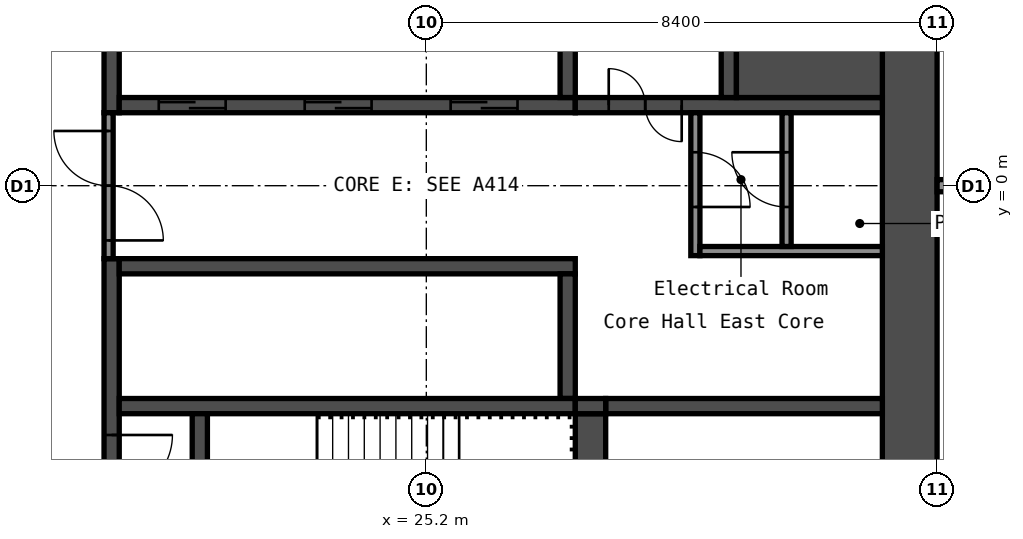
"""IFC4 building model, lengths in metres.
Left out: names, types, materials, properties, quantities, classifications, styles, units other than length and angle.
Written with IfcOpenShell. Run it as: python <this file> out.ifc"""

import sys

from ifc_helpers import new_model, si_unit, direction, frame, frame_2d, origin, place, context, subcontext, project, spatial, rectangle, extrude, element, fill, save


model = new_model("IFC4")
c1 = context("Model", 3, precision=1e-05, world=origin(), true_north=direction((0.0, 1.0)))
c2 = subcontext(c1, "Body", "Model", "MODEL_VIEW")
j1 = project(units=[si_unit("LENGTHUNIT", "METRE"), si_unit("PLANEANGLEUNIT", "RADIAN")], contexts=[c1])
p1 = place(None, origin())
s1 = spatial("IfcSite", under=j1, at=p1, CompositionType="ELEMENT")
p2 = place(p1, origin())
s2 = spatial("IfcBuilding", under=s1, at=p2, CompositionType="ELEMENT")
p3 = place(p2, frame((0.0, 0.0, 91.4)))
s3 = spatial("IfcBuildingStorey", under=s2, at=p3, CompositionType="ELEMENT", Elevation=91.4)
p4 = place(p3, frame((33.15, -8.4, 0.0), z_axis=(0.0, 0.0, 1.0), x_axis=(0.0, 1.0, 0.0)))
e1 = element("IfcWall", 1, at=p4, inside=s3, PredefinedType="SHEAR", context=c2, shape_type="SweptSolid", body=[
    extrude(rectangle(XDim=16.8, YDim=0.9, at=frame_2d((8.4, 0.0))), origin(), (0.0, 0.0, 1.0), 2.8),
])
p5 = place(p3, frame((20.025, 1.2, 0.0), z_axis=(0.0, 0.0, 1.0), x_axis=(0.0, 1.0, 0.0)))
e2 = element("IfcWall", 2, at=p5, inside=s3, PredefinedType="SHEAR", context=c2, shape_type="SweptSolid", body=[
    extrude(rectangle(XDim=6.3, YDim=0.25, at=frame_2d((3.15, 0.0))), origin(), (0.0, 0.0, 1.0), 2.8),
])
p6 = place(p3, frame((20.025, -7.5, 0.0), z_axis=(0.0, 0.0, 1.0), x_axis=(0.0, 1.0, 0.0)))
e3 = element("IfcWall", 3, at=p6, inside=s3, PredefinedType="SHEAR", context=c2, shape_type="SweptSolid", body=[
    extrude(rectangle(XDim=6.3, YDim=0.25, at=frame_2d((3.15, 0.0))), origin(), (0.0, 0.0, 1.0), 2.8),
])
p7 = place(p6, frame((2.4, 0.0, 0.0)))
e4 = element("IfcOpeningElement", 4, at=p7, cuts=e3, PredefinedType="OPENING", context=c2, shape_type="SweptSolid", body=[
    extrude(rectangle(XDim=1.0, YDim=2.1, at=frame_2d((0.5, 1.05))), frame((0.0, 0.135, 0.0), z_axis=(0.0, -1.0, 0.0), x_axis=(1.0, 0.0, 0.0)), (0.0, 0.0, 1.0), 0.27),
])
p8 = place(p3, frame((20.15, 1.325, 0.0), z_axis=(0.0, 0.0, 1.0), x_axis=(1.0, 0.0, 0.0)))
e5 = element("IfcWall", 5, at=p8, inside=s3, PredefinedType="SHEAR", context=c2, shape_type="SweptSolid", body=[
    extrude(rectangle(XDim=7.5, YDim=0.25, at=frame_2d((3.75, 0.0))), origin(), (0.0, 0.0, 1.0), 2.8),
])
p9 = place(p8, frame((0.65, 0.0, 0.0)))
e6 = element("IfcOpeningElement", 6, at=p9, cuts=e5, PredefinedType="OPENING", context=c2, shape_type="SweptSolid", body=[
    extrude(rectangle(XDim=1.1, YDim=2.1, at=frame_2d((0.55, 1.05))), frame((0.0, 0.135, 0.0), z_axis=(0.0, -1.0, 0.0), x_axis=(1.0, 0.0, 0.0)), (0.0, 0.0, 1.0), 0.27),
])
p10 = place(p8, frame((3.05, 0.0, 0.0)))
e7 = element("IfcOpeningElement", 7, at=p10, cuts=e5, PredefinedType="OPENING", context=c2, shape_type="SweptSolid", body=[
    extrude(rectangle(XDim=1.1, YDim=2.1, at=frame_2d((0.55, 1.05))), frame((0.0, 0.135, 0.0), z_axis=(0.0, -1.0, 0.0), x_axis=(1.0, 0.0, 0.0)), (0.0, 0.0, 1.0), 0.27),
])
p11 = place(p8, frame((5.45, 0.0, 0.0)))
e8 = element("IfcOpeningElement", 8, at=p11, cuts=e5, PredefinedType="OPENING", context=c2, shape_type="SweptSolid", body=[
    extrude(rectangle(XDim=1.1, YDim=2.1, at=frame_2d((0.55, 1.05))), frame((0.0, 0.135, 0.0), z_axis=(0.0, -1.0, 0.0), x_axis=(1.0, 0.0, 0.0)), (0.0, 0.0, 1.0), 0.27),
])
p12 = place(p3, frame((27.525, 1.45, 0.0), z_axis=(0.0, 0.0, 1.0), x_axis=(0.0, 1.0, 0.0)))
e9 = element("IfcWall", 9, at=p12, inside=s3, PredefinedType="SHEAR", context=c2, shape_type="SweptSolid", body=[
    extrude(rectangle(XDim=2.05, YDim=0.25, at=frame_2d((1.025, 0.0))), origin(), (0.0, 0.0, 1.0), 2.8),
])
p13 = place(p3, frame((27.65, 1.325, 0.0), z_axis=(0.0, 0.0, 1.0), x_axis=(1.0, 0.0, 0.0)))
e10 = element("IfcWall", 10, at=p13, inside=s3, PredefinedType="SHEAR", context=c2, shape_type="SweptSolid", body=[
    extrude(rectangle(XDim=5.05, YDim=0.25, at=frame_2d((2.525, 0.0))), origin(), (0.0, 0.0, 1.0), 2.8),
])
p14 = place(p13, frame((0.55, 0.0, 0.0)))
e11 = element("IfcOpeningElement", 11, at=p14, cuts=e10, PredefinedType="OPENING", context=c2, shape_type="SweptSolid", body=[
    extrude(rectangle(XDim=1.2, YDim=2.1, at=frame_2d((0.6, 1.05))), frame((0.0, 0.135, 0.0), z_axis=(0.0, -1.0, 0.0), x_axis=(1.0, 0.0, 0.0)), (0.0, 0.0, 1.0), 0.27),
])
p15 = place(p3, frame((30.175, 1.45, 0.0), z_axis=(0.0, 0.0, 1.0), x_axis=(0.0, 1.0, 0.0)))
e12 = element("IfcWall", 12, at=p15, inside=s3, PredefinedType="SHEAR", context=c2, shape_type="SweptSolid", body=[
    extrude(rectangle(XDim=6.05, YDim=0.25, at=frame_2d((3.025, 0.0))), origin(), (0.0, 0.0, 1.0), 2.8),
])
p16 = place(p15, frame((2.625, 0.0, 0.0)))
e13 = element("IfcOpeningElement", 13, at=p16, cuts=e12, PredefinedType="OPENING", context=c2, shape_type="SweptSolid", body=[
    extrude(rectangle(XDim=1.1, YDim=2.1, at=frame_2d((0.55, 1.05))), frame((0.0, 0.135, 0.0), z_axis=(0.0, -1.0, 0.0), x_axis=(1.0, 0.0, 0.0)), (0.0, 0.0, 1.0), 0.27),
])
p17 = place(p3, frame((30.3, 2.375, 0.0), z_axis=(0.0, 0.0, 1.0), x_axis=(1.0, 0.0, 0.0)))
e14 = element("IfcWall", 14, at=p17, inside=s3, PredefinedType="SHEAR", context=c2, shape_type="SweptSolid", body=[
    extrude(rectangle(XDim=2.4, YDim=1.85, at=frame_2d((1.2, 0.0))), origin(), (0.0, 0.0, 1.0), 2.8),
])
p18 = place(p3, frame((20.15, -1.325, 0.0), z_axis=(0.0, 0.0, 1.0), x_axis=(1.0, 0.0, 0.0)))
e15 = element("IfcWall", 15, at=p18, inside=s3, PredefinedType="SHEAR", context=c2, shape_type="SweptSolid", body=[
    extrude(rectangle(XDim=7.5, YDim=0.25, at=frame_2d((3.75, 0.0))), origin(), (0.0, 0.0, 1.0), 2.8),
])
p19 = place(p3, frame((27.525, -3.5, 0.0), z_axis=(0.0, 0.0, 1.0), x_axis=(0.0, 1.0, 0.0)))
e16 = element("IfcWall", 16, at=p19, inside=s3, PredefinedType="SHEAR", context=c2, shape_type="SweptSolid", body=[
    extrude(rectangle(XDim=2.05, YDim=0.25, at=frame_2d((1.025, 0.0))), origin(), (0.0, 0.0, 1.0), 2.8),
])
p20 = place(p3, frame((20.15, -3.625, 0.0), z_axis=(0.0, 0.0, 1.0), x_axis=(1.0, 0.0, 0.0)))
e17 = element("IfcWall", 17, at=p20, inside=s3, PredefinedType="SHEAR", context=c2, shape_type="SweptSolid", body=[
    extrude(rectangle(XDim=7.5, YDim=0.25, at=frame_2d((3.75, 0.0))), origin(), (0.0, 0.0, 1.0), 2.8),
])
p21 = place(p3, frame((21.475, -7.5, 0.0), z_axis=(0.0, 0.0, 1.0), x_axis=(0.0, 1.0, 0.0)))
e18 = element("IfcWall", 18, at=p21, inside=s3, PredefinedType="SHEAR", context=c2, shape_type="SweptSolid", body=[
    extrude(rectangle(XDim=3.75, YDim=0.25, at=frame_2d((1.875, 0.0))), origin(), (0.0, 0.0, 1.0), 2.8),
])
p22 = place(p21, frame((1.3, 0.0, 0.0)))
e19 = element("IfcOpeningElement", 19, at=p22, cuts=e18, PredefinedType="OPENING", context=c2, shape_type="SweptSolid", body=[
    extrude(rectangle(XDim=1.2, YDim=2.1, at=frame_2d((0.6, 1.05))), frame((0.0, 0.135, 0.0), z_axis=(0.0, -1.0, 0.0), x_axis=(1.0, 0.0, 0.0)), (0.0, 0.0, 1.0), 0.27),
])
p23 = place(p3, frame((27.9, -7.5, 0.0), z_axis=(0.0, 0.0, 1.0), x_axis=(0.0, 1.0, 0.0)))
e20 = element("IfcWall", 20, at=p23, inside=s3, PredefinedType="SHEAR", context=c2, shape_type="SweptSolid", body=[
    extrude(rectangle(XDim=3.75, YDim=0.5, at=frame_2d((1.875, 0.0))), origin(), (0.0, 0.0, 1.0), 2.8),
])
p24 = place(p3, frame((28.15, -3.625, 0.0), z_axis=(0.0, 0.0, 1.0), x_axis=(1.0, 0.0, 0.0)))
e21 = element("IfcWall", 21, at=p24, inside=s3, PredefinedType="SHEAR", context=c2, shape_type="SweptSolid", body=[
    extrude(rectangle(XDim=4.55, YDim=0.25, at=frame_2d((2.275, 0.0))), origin(), (0.0, 0.0, 1.0), 2.8),
])
p25 = place(p3, frame((27.65, -3.625, 0.0), z_axis=(0.0, 0.0, 1.0), x_axis=(1.0, 0.0, 0.0)))
e22 = element("IfcWall", 22, at=p25, inside=s3, PredefinedType="SHEAR", context=c2, shape_type="SweptSolid", body=[
    extrude(rectangle(XDim=0.5, YDim=0.25, at=frame_2d((0.25, 0.0))), origin(), (0.0, 0.0, 1.0), 2.8),
])
p26 = place(p3, frame((19.975, -1.2, 0.0), z_axis=(0.0, 0.0, 1.0), x_axis=(0.0, 1.0, 0.0)))
e23 = element("IfcWall", 23, at=p26, inside=s3, PredefinedType="PARTITIONING", context=c2, shape_type="SweptSolid", body=[
    extrude(rectangle(XDim=2.4, YDim=0.15, at=frame_2d((1.2, 0.0))), origin(), (0.0, 0.0, 1.0), 2.8),
])
p27 = place(p26, frame((0.3, 0.0, 0.0)))
e24 = element("IfcOpeningElement", 24, at=p27, cuts=e23, PredefinedType="OPENING", context=c2, shape_type="SweptSolid", body=[
    extrude(rectangle(XDim=1.8, YDim=2.1, at=frame_2d((0.9, 1.05))), frame((0.0, 0.085, 0.0), z_axis=(0.0, -1.0, 0.0), x_axis=(1.0, 0.0, 0.0)), (0.0, 0.0, 1.0), 0.17),
])
p28 = place(p3, frame((29.625, -1.15, 0.0), z_axis=(0.0, 0.0, 1.0), x_axis=(0.0, 1.0, 0.0)))
e25 = element("IfcWall", 25, at=p28, inside=s3, PredefinedType="PARTITIONING", context=c2, shape_type="SweptSolid", body=[
    extrude(rectangle(XDim=2.35, YDim=0.15, at=frame_2d((1.175, 0.0))), origin(), (0.0, 0.0, 1.0), 2.8),
])
p29 = place(p28, frame((0.8, 0.0, 0.0)))
e26 = element("IfcOpeningElement", 26, at=p29, cuts=e25, PredefinedType="OPENING", context=c2, shape_type="SweptSolid", body=[
    extrude(rectangle(XDim=0.9, YDim=2.1, at=frame_2d((0.45, 1.05))), frame((0.0, 0.085, 0.0), z_axis=(0.0, -1.0, 0.0), x_axis=(1.0, 0.0, 0.0)), (0.0, 0.0, 1.0), 0.17),
])
p30 = place(p3, frame((29.7, -1.075, 0.0), z_axis=(0.0, 0.0, 1.0), x_axis=(1.0, 0.0, 0.0)))
e27 = element("IfcWall", 27, at=p30, inside=s3, PredefinedType="PARTITIONING", context=c2, shape_type="SweptSolid", body=[
    extrude(rectangle(XDim=3.0, YDim=0.15, at=frame_2d((1.5, 0.0))), origin(), (0.0, 0.0, 1.0), 2.8),
])
p31 = place(p3, frame((31.125, -1.0, 0.0), z_axis=(0.0, 0.0, 1.0), x_axis=(0.0, 1.0, 0.0)))
e28 = element("IfcWall", 28, at=p31, inside=s3, PredefinedType="PARTITIONING", context=c2, shape_type="SweptSolid", body=[
    extrude(rectangle(XDim=2.2, YDim=0.15, at=frame_2d((1.1, 0.0))), origin(), (0.0, 0.0, 1.0), 2.8),
])
p32 = place(p31, frame((0.65, 0.0, 0.0)))
e29 = element("IfcOpeningElement", 29, at=p32, cuts=e28, PredefinedType="OPENING", context=c2, shape_type="SweptSolid", body=[
    extrude(rectangle(XDim=0.9, YDim=2.1, at=frame_2d((0.45, 1.05))), frame((0.0, 0.085, 0.0), z_axis=(0.0, -1.0, 0.0), x_axis=(1.0, 0.0, 0.0)), (0.0, 0.0, 1.0), 0.17),
])
p33 = place(p3, frame((33.6, 0.0, 0.0), z_axis=(0.0, 0.0, 1.0), x_axis=(1.0, 0.0, 0.0)))
e30 = element("IfcWall", 30, at=p33, inside=s3, PredefinedType="PARTITIONING", context=c2, shape_type="SweptSolid", body=[
    extrude(rectangle(XDim=10.3, YDim=0.2, at=frame_2d((5.15, 0.0))), origin(), (0.0, 0.0, 1.0), 2.8),
])
p34 = place(p7, origin())
e31 = element("IfcDoor", 31, at=p34, inside=s3, OperationType="SINGLE_SWING_RIGHT", PredefinedType="DOOR", context=c2, shape_type="SweptSolid", body=[
    extrude(rectangle(XDim=1.0, YDim=2.1, at=frame_2d((0.5, 1.05))), frame((0.0, 0.025, 0.0), z_axis=(0.0, -1.0, 0.0), x_axis=(1.0, 0.0, 0.0)), (0.0, 0.0, 1.0), 0.05),
])
fill(e4, e31)
p35 = place(p14, origin())
e32 = element("IfcDoor", 32, at=p35, inside=s3, OperationType="DOUBLE_DOOR_SINGLE_SWING", PredefinedType="DOOR", context=c2, shape_type="SweptSolid", body=[
    extrude(rectangle(XDim=1.2, YDim=2.1, at=frame_2d((0.6, 1.05))), frame((0.0, 0.025, 0.0), z_axis=(0.0, -1.0, 0.0), x_axis=(1.0, 0.0, 0.0)), (0.0, 0.0, 1.0), 0.05),
])
fill(e11, e32)
p36 = place(p27, origin())
e33 = element("IfcDoor", 33, at=p36, inside=s3, OperationType="DOUBLE_DOOR_SINGLE_SWING", PredefinedType="DOOR", context=c2, shape_type="SweptSolid", body=[
    extrude(rectangle(XDim=1.8, YDim=2.1, at=frame_2d((0.9, 1.05))), frame((0.0, 0.025, 0.0), z_axis=(0.0, -1.0, 0.0), x_axis=(1.0, 0.0, 0.0)), (0.0, 0.0, 1.0), 0.05),
])
fill(e24, e33)
p37 = place(p29, origin())
e34 = element("IfcDoor", 34, at=p37, inside=s3, OperationType="SINGLE_SWING_LEFT", PredefinedType="DOOR", context=c2, shape_type="SweptSolid", body=[
    extrude(rectangle(XDim=0.9, YDim=2.1, at=frame_2d((0.45, 1.05))), frame((0.0, 0.025, 0.0), z_axis=(0.0, -1.0, 0.0), x_axis=(1.0, 0.0, 0.0)), (0.0, 0.0, 1.0), 0.05),
])
fill(e26, e34)
p38 = place(p32, origin())
e35 = element("IfcDoor", 35, at=p38, inside=s3, OperationType="SINGLE_SWING_LEFT", PredefinedType="DOOR", context=c2, shape_type="SweptSolid", body=[
    extrude(rectangle(XDim=0.9, YDim=2.1, at=frame_2d((0.45, 1.05))), frame((0.0, 0.025, 0.0), z_axis=(0.0, -1.0, 0.0), x_axis=(1.0, 0.0, 0.0)), (0.0, 0.0, 1.0), 0.05),
])
fill(e29, e35)
p39 = place(p9, origin())
e36 = element("IfcDoor", 36, at=p39, inside=s3, OperationType="DOUBLE_DOOR_SLIDING", PredefinedType="DOOR", context=c2, shape_type="SweptSolid", body=[
    extrude(rectangle(XDim=1.1, YDim=2.1, at=frame_2d((0.55, 1.05))), frame((0.0, 0.025, 0.0), z_axis=(0.0, -1.0, 0.0), x_axis=(1.0, 0.0, 0.0)), (0.0, 0.0, 1.0), 0.05),
])
fill(e6, e36)
p40 = place(p10, origin())
e37 = element("IfcDoor", 37, at=p40, inside=s3, OperationType="DOUBLE_DOOR_SLIDING", PredefinedType="DOOR", context=c2, shape_type="SweptSolid", body=[
    extrude(rectangle(XDim=1.1, YDim=2.1, at=frame_2d((0.55, 1.05))), frame((0.0, 0.025, 0.0), z_axis=(0.0, -1.0, 0.0), x_axis=(1.0, 0.0, 0.0)), (0.0, 0.0, 1.0), 0.05),
])
fill(e7, e37)
p41 = place(p11, origin())
e38 = element("IfcDoor", 38, at=p41, inside=s3, OperationType="DOUBLE_DOOR_SLIDING", PredefinedType="DOOR", context=c2, shape_type="SweptSolid", body=[
    extrude(rectangle(XDim=1.1, YDim=2.1, at=frame_2d((0.55, 1.05))), frame((0.0, 0.025, 0.0), z_axis=(0.0, -1.0, 0.0), x_axis=(1.0, 0.0, 0.0)), (0.0, 0.0, 1.0), 0.05),
])
fill(e8, e38)
save(model, sys.argv[1])
